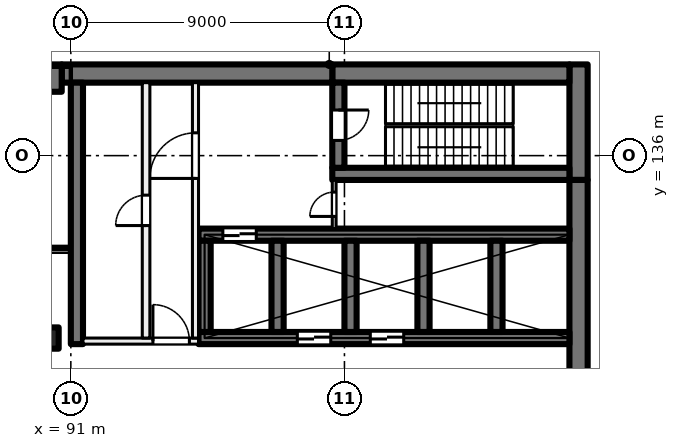
"""IFC4 building model, lengths in metres.
Left out: names, types, materials, properties, quantities, classifications, styles, units other than length and angle.
Written with IfcOpenShell. Run it as: python <this file> out.ifc"""

import sys

from ifc_helpers import new_model, si_unit, direction, frame, frame_2d, origin, origin_2d, place, context, subcontext, project, spatial, rectangle, extrude, element, fill, save


model = new_model("IFC4")
c1 = context("Model", 3, precision=1e-05, world=origin(), true_north=direction((0.0, 1.0)))
c2 = subcontext(c1, "Body", "Model", "MODEL_VIEW")
j1 = project(units=[si_unit("LENGTHUNIT", "METRE"), si_unit("PLANEANGLEUNIT", "RADIAN")], contexts=[c1])
p1 = place(None, origin())
s1 = spatial("IfcSite", under=j1, at=p1, CompositionType="ELEMENT")
p2 = place(p1, origin())
s2 = spatial("IfcBuilding", under=s1, at=p2, CompositionType="ELEMENT")
p3 = place(p2, frame((0.0, 0.0, 75.5)))
s3 = spatial("IfcBuildingStorey", under=s2, at=p3, CompositionType="ELEMENT", Elevation=75.5)
p4 = place(p3, frame((90.25, 130.0, 0.0), z_axis=(0.0, 0.0, 1.0), x_axis=(1.0, 0.0, 0.0)))
e1 = element("IfcColumn", 1, at=p4, inside=s3, PredefinedType="COLUMN", context=c2, shape_type="SweptSolid", body=[
    extrude(rectangle(XDim=0.7, YDim=0.7, at=origin_2d()), origin(), (0.0, 0.0, 1.0), 5.5),
])
p5 = place(p3, frame((90.25, 138.55, 0.0), z_axis=(0.0, 0.0, 1.0), x_axis=(1.0, 0.0, 0.0)))
e2 = element("IfcColumn", 2, at=p5, inside=s3, PredefinedType="COLUMN", context=c2, shape_type="SweptSolid", body=[
    extrude(rectangle(XDim=0.9, YDim=0.9, at=origin_2d()), origin(), (0.0, 0.0, 1.0), 5.5),
])
p6 = place(p3, frame((107.7, 139.0, 0.0), z_axis=(0.0, 0.0, 1.0), x_axis=(0.0, -1.0, 0.0)))
e3 = element("IfcWall", 3, at=p6, inside=s3, PredefinedType="SHEAR", context=c2, shape_type="SweptSolid", body=[
    extrude(rectangle(XDim=3.8, YDim=0.6, at=frame_2d((1.9, 0.0))), origin(), (0.0, 0.0, 1.0), 5.5),
])
p7 = place(p3, frame((107.7, 135.2, 0.0), z_axis=(0.0, 0.0, 1.0), x_axis=(0.0, -1.0, 0.0)))
e4 = element("IfcWall", 4, at=p7, inside=s3, PredefinedType="SHEAR", context=c2, shape_type="SweptSolid", body=[
    extrude(rectangle(XDim=14.4, YDim=0.6, at=frame_2d((7.2, 0.0))), origin(), (0.0, 0.0, 1.0), 5.5),
])
p8 = place(p3, frame((107.4, 138.7, 0.0), z_axis=(0.0, 0.0, 1.0), x_axis=(-1.0, 0.0, 0.0)))
e5 = element("IfcWall", 5, at=p8, inside=s3, PredefinedType="SHEAR", context=c2, shape_type="SweptSolid", body=[
    extrude(rectangle(XDim=7.8, YDim=0.6, at=frame_2d((3.9, 0.0))), origin(), (0.0, 0.0, 1.0), 5.5),
])
p9 = place(p3, frame((99.6, 138.7, 0.0), z_axis=(0.0, 0.0, 1.0), x_axis=(-1.0, 0.0, 0.0)))
e6 = element("IfcWall", 6, at=p9, inside=s3, PredefinedType="SHEAR", context=c2, shape_type="SweptSolid", body=[
    extrude(rectangle(XDim=8.9, YDim=0.6, at=frame_2d((4.45, 0.0))), origin(), (0.0, 0.0, 1.0), 5.5),
])
p10 = place(p3, frame((107.4, 135.4, 0.0), z_axis=(0.0, 0.0, 1.0), x_axis=(-1.0, 0.0, 0.0)))
e7 = element("IfcWall", 7, at=p10, inside=s3, PredefinedType="SHEAR", context=c2, shape_type="SweptSolid", body=[
    extrude(rectangle(XDim=7.8, YDim=0.4, at=frame_2d((3.9, 0.0))), origin(), (0.0, 0.0, 1.0), 5.5),
])
p11 = place(p3, frame((99.8, 138.4, 0.0), z_axis=(0.0, 0.0, 1.0), x_axis=(0.0, -1.0, 0.0)))
e8 = element("IfcWall", 8, at=p11, inside=s3, PredefinedType="SHEAR", context=c2, shape_type="SweptSolid", body=[
    extrude(rectangle(XDim=2.8, YDim=0.4, at=frame_2d((1.4, 0.0))), origin(), (0.0, 0.0, 1.0), 5.5),
])
p12 = place(p11, frame((0.9, 0.0, 0.0)))
e9 = element("IfcOpeningElement", 9, at=p12, cuts=e8, PredefinedType="OPENING", context=c2, shape_type="SweptSolid", body=[
    extrude(rectangle(XDim=1.0, YDim=2.1, at=frame_2d((0.5, 1.05))), frame((0.0, 0.21, 0.0), z_axis=(0.0, -1.0, 0.0), x_axis=(1.0, 0.0, 0.0)), (0.0, 0.0, 1.0), 0.42),
])
p13 = place(p3, frame((107.4, 130.0, 0.0), z_axis=(0.0, 0.0, 1.0), x_axis=(-1.0, 0.0, 0.0)))
e10 = element("IfcWall", 10, at=p13, inside=s3, PredefinedType="SHEAR", context=c2, shape_type="SweptSolid", body=[
    extrude(rectangle(XDim=12.2, YDim=0.4, at=frame_2d((6.1, 0.0))), origin(), (0.0, 0.0, 1.0), 5.5),
])
p14 = place(p13, frame((5.45, 0.0, 0.0)))
e11 = element("IfcOpeningElement", 11, at=p14, cuts=e10, PredefinedType="OPENING", context=c2, shape_type="SweptSolid", body=[
    extrude(rectangle(XDim=1.1, YDim=2.1, at=frame_2d((0.55, 1.05))), frame((0.0, 0.21, 0.0), z_axis=(0.0, -1.0, 0.0), x_axis=(1.0, 0.0, 0.0)), (0.0, 0.0, 1.0), 0.42),
])
p15 = place(p13, frame((7.85, 0.0, 0.0)))
e12 = element("IfcOpeningElement", 12, at=p15, cuts=e10, PredefinedType="OPENING", context=c2, shape_type="SweptSolid", body=[
    extrude(rectangle(XDim=1.1, YDim=2.1, at=frame_2d((0.55, 1.05))), frame((0.0, 0.21, 0.0), z_axis=(0.0, -1.0, 0.0), x_axis=(1.0, 0.0, 0.0)), (0.0, 0.0, 1.0), 0.42),
])
p16 = place(p3, frame((107.4, 133.4, 0.0), z_axis=(0.0, 0.0, 1.0), x_axis=(-1.0, 0.0, 0.0)))
e13 = element("IfcWall", 13, at=p16, inside=s3, PredefinedType="SHEAR", context=c2, shape_type="SweptSolid", body=[
    extrude(rectangle(XDim=12.2, YDim=0.4, at=frame_2d((6.1, 0.0))), origin(), (0.0, 0.0, 1.0), 5.5),
])
p17 = place(p16, frame((10.3, 0.0, 0.0)))
e14 = element("IfcOpeningElement", 14, at=p17, cuts=e13, PredefinedType="OPENING", context=c2, shape_type="SweptSolid", body=[
    extrude(rectangle(XDim=1.1, YDim=2.1, at=frame_2d((0.55, 1.05))), frame((0.0, 0.21, 0.0), z_axis=(0.0, -1.0, 0.0), x_axis=(1.0, 0.0, 0.0)), (0.0, 0.0, 1.0), 0.42),
])
for number, where, z_axis, x_axis in (
    (15, (105.0, 133.2, 0.0), (0.0, 0.0, 1.0), (0.0, -1.0, 0.0)),
    (16, (102.6, 133.2, 0.0), (0.0, 0.0, 1.0), (0.0, -1.0, 0.0)),
    (17, (100.2, 133.2, 0.0), (0.0, 0.0, 1.0), (0.0, -1.0, 0.0)),
    (18, (97.8, 133.2, 0.0), (0.0, 0.0, 1.0), (0.0, -1.0, 0.0)),
    (19, (95.4, 133.2, 0.0), (0.0, 0.0, 1.0), (0.0, -1.0, 0.0)),
):
    element("IfcWall", number, at=place(p3, frame(where, z_axis=z_axis, x_axis=x_axis)), inside=s3, PredefinedType="SHEAR", context=c2, shape_type="SweptSolid", body=[
        extrude(rectangle(XDim=3.0, YDim=0.4, at=frame_2d((1.5, 0.0))), origin(), (0.0, 0.0, 1.0), 5.5),
    ])
p18 = place(p3, frame((91.2, 138.4, 0.0), z_axis=(0.0, 0.0, 1.0), x_axis=(0.0, -1.0, 0.0)))
e20 = element("IfcWall", 20, at=p18, inside=s3, PredefinedType="SHEAR", context=c2, shape_type="SweptSolid", body=[
    extrude(rectangle(XDim=8.6, YDim=0.4, at=frame_2d((4.3, 0.0))), origin(), (0.0, 0.0, 1.0), 5.5),
])
p19 = place(p3, frame((91.4, 129.9, 0.0), z_axis=(0.0, 0.0, 1.0), x_axis=(1.0, 0.0, 0.0)))
e21 = element("IfcWall", 21, at=p19, inside=s3, PredefinedType="PARTITIONING", context=c2, shape_type="SweptSolid", body=[
    extrude(rectangle(XDim=3.8, YDim=0.2, at=frame_2d((1.9, 0.0))), origin(), (0.0, 0.0, 1.0), 5.125),
])
p20 = place(p19, frame((2.3, 0.0, 0.0)))
e22 = element("IfcOpeningElement", 22, at=p20, cuts=e21, PredefinedType="OPENING", context=c2, shape_type="SweptSolid", body=[
    extrude(rectangle(XDim=1.2, YDim=2.1, at=frame_2d((0.6, 1.05))), frame((0.0, 0.11, 0.0), z_axis=(0.0, -1.0, 0.0), x_axis=(1.0, 0.0, 0.0)), (0.0, 0.0, 1.0), 0.22),
])
p21 = place(p3, frame((95.1, 130.0, 0.0), z_axis=(0.0, 0.0, 1.0), x_axis=(0.0, 1.0, 0.0)))
e23 = element("IfcWall", 23, at=p21, inside=s3, PredefinedType="PARTITIONING", context=c2, shape_type="SweptSolid", body=[
    extrude(rectangle(XDim=8.4, YDim=0.2, at=frame_2d((4.2, 0.0))), origin(), (0.0, 0.0, 1.0), 5.125),
])
p22 = place(p21, frame((5.25, 0.0, 0.0)))
e24 = element("IfcOpeningElement", 24, at=p22, cuts=e23, PredefinedType="OPENING", context=c2, shape_type="SweptSolid", body=[
    extrude(rectangle(XDim=1.5, YDim=2.1, at=frame_2d((0.75, 1.05))), frame((0.0, 0.11, 0.0), z_axis=(0.0, -1.0, 0.0), x_axis=(1.0, 0.0, 0.0)), (0.0, 0.0, 1.0), 0.22),
])
p23 = place(p3, frame((93.475, 130.0, 0.0), z_axis=(0.0, 0.0, 1.0), x_axis=(0.0, 1.0, 0.0)))
e25 = element("IfcWall", 25, at=p23, inside=s3, PredefinedType="PARTITIONING", context=c2, shape_type="SweptSolid", body=[
    extrude(rectangle(XDim=8.4, YDim=0.25, at=frame_2d((4.2, 0.0))), origin(), (0.0, 0.0, 1.0), 5.125),
])
p24 = place(p23, frame((3.7, 0.0, 0.0)))
e26 = element("IfcOpeningElement", 26, at=p24, cuts=e25, PredefinedType="OPENING", context=c2, shape_type="SweptSolid", body=[
    extrude(rectangle(XDim=1.0, YDim=2.1, at=frame_2d((0.5, 1.05))), frame((0.0, 0.135, 0.0), z_axis=(0.0, -1.0, 0.0), x_axis=(1.0, 0.0, 0.0)), (0.0, 0.0, 1.0), 0.27),
])
p25 = place(p3, frame((99.663, 133.6, 0.0), z_axis=(0.0, 0.0, 1.0), x_axis=(0.0, 1.0, 0.0)))
e27 = element("IfcWall", 27, at=p25, inside=s3, PredefinedType="PARTITIONING", context=c2, shape_type="SweptSolid", body=[
    extrude(rectangle(XDim=1.6, YDim=0.125, at=frame_2d((0.8, 0.0))), origin(), (0.0, 0.0, 1.0), 5.125),
])
p26 = place(p25, frame((0.4, 0.0, 0.0)))
e28 = element("IfcOpeningElement", 28, at=p26, cuts=e27, PredefinedType="OPENING", context=c2, shape_type="SweptSolid", body=[
    extrude(rectangle(XDim=0.8, YDim=2.1, at=frame_2d((0.4, 1.05))), frame((0.0, 0.073, 0.0), z_axis=(0.0, -1.0, 0.0), x_axis=(1.0, 0.0, 0.0)), (0.0, 0.0, 1.0), 0.145),
])
p27 = place(p14, origin())
e29 = element("IfcDoor", 29, at=p27, inside=s3, OperationType="DOUBLE_DOOR_SLIDING", PredefinedType="DOOR", context=c2, shape_type="SweptSolid", body=[
    extrude(rectangle(XDim=1.1, YDim=2.1, at=frame_2d((0.55, 1.05))), frame((0.0, 0.025, 0.0), z_axis=(0.0, -1.0, 0.0), x_axis=(1.0, 0.0, 0.0)), (0.0, 0.0, 1.0), 0.05),
])
fill(e11, e29)
p28 = place(p15, origin())
e30 = element("IfcDoor", 30, at=p28, inside=s3, OperationType="DOUBLE_DOOR_SLIDING", PredefinedType="DOOR", context=c2, shape_type="SweptSolid", body=[
    extrude(rectangle(XDim=1.1, YDim=2.1, at=frame_2d((0.55, 1.05))), frame((0.0, 0.025, 0.0), z_axis=(0.0, -1.0, 0.0), x_axis=(1.0, 0.0, 0.0)), (0.0, 0.0, 1.0), 0.05),
])
fill(e12, e30)
p29 = place(p20, origin())
e31 = element("IfcDoor", 31, at=p29, inside=s3, OperationType="DOUBLE_DOOR_SINGLE_SWING", PredefinedType="DOOR", context=c2, shape_type="SweptSolid", body=[
    extrude(rectangle(XDim=1.2, YDim=2.1, at=frame_2d((0.6, 1.05))), frame((0.0, 0.025, 0.0), z_axis=(0.0, -1.0, 0.0), x_axis=(1.0, 0.0, 0.0)), (0.0, 0.0, 1.0), 0.05),
])
fill(e22, e31)
p30 = place(p22, origin())
e32 = element("IfcDoor", 32, at=p30, inside=s3, OperationType="DOUBLE_DOOR_SINGLE_SWING", PredefinedType="DOOR", context=c2, shape_type="SweptSolid", body=[
    extrude(rectangle(XDim=1.5, YDim=2.1, at=frame_2d((0.75, 1.05))), frame((0.0, 0.025, 0.0), z_axis=(0.0, -1.0, 0.0), x_axis=(1.0, 0.0, 0.0)), (0.0, 0.0, 1.0), 0.05),
])
fill(e24, e32)
p31 = place(p12, origin())
e33 = element("IfcDoor", 33, at=p31, inside=s3, OperationType="SINGLE_SWING_RIGHT", PredefinedType="DOOR", context=c2, shape_type="SweptSolid", body=[
    extrude(rectangle(XDim=1.0, YDim=2.1, at=frame_2d((0.5, 1.05))), frame((0.0, 0.025, 0.0), z_axis=(0.0, -1.0, 0.0), x_axis=(1.0, 0.0, 0.0)), (0.0, 0.0, 1.0), 0.05),
])
fill(e9, e33)
p32 = place(p26, origin())
e34 = element("IfcDoor", 34, at=p32, inside=s3, OperationType="SINGLE_SWING_LEFT", PredefinedType="DOOR", context=c2, shape_type="SweptSolid", body=[
    extrude(rectangle(XDim=0.8, YDim=2.1, at=frame_2d((0.4, 1.05))), frame((0.0, 0.025, 0.0), z_axis=(0.0, -1.0, 0.0), x_axis=(1.0, 0.0, 0.0)), (0.0, 0.0, 1.0), 0.05),
])
fill(e28, e34)
p33 = place(p24, origin())
e35 = element("IfcDoor", 35, at=p33, inside=s3, OperationType="SINGLE_SWING_RIGHT", PredefinedType="DOOR", context=c2, shape_type="SweptSolid", body=[
    extrude(rectangle(XDim=1.0, YDim=2.1, at=frame_2d((0.5, 1.05))), frame((0.0, 0.025, 0.0), z_axis=(0.0, -1.0, 0.0), x_axis=(1.0, 0.0, 0.0)), (0.0, 0.0, 1.0), 0.05),
])
fill(e26, e35)
p34 = place(p17, origin())
e36 = element("IfcDoor", 36, at=p34, inside=s3, OperationType="DOUBLE_DOOR_SLIDING", PredefinedType="DOOR", context=c2, shape_type="SweptSolid", body=[
    extrude(rectangle(XDim=1.1, YDim=2.1, at=frame_2d((0.55, 1.05))), frame((0.0, 0.025, 0.0), z_axis=(0.0, -1.0, 0.0), x_axis=(1.0, 0.0, 0.0)), (0.0, 0.0, 1.0), 0.05),
])
fill(e14, e36)
save(model, sys.argv[1])
